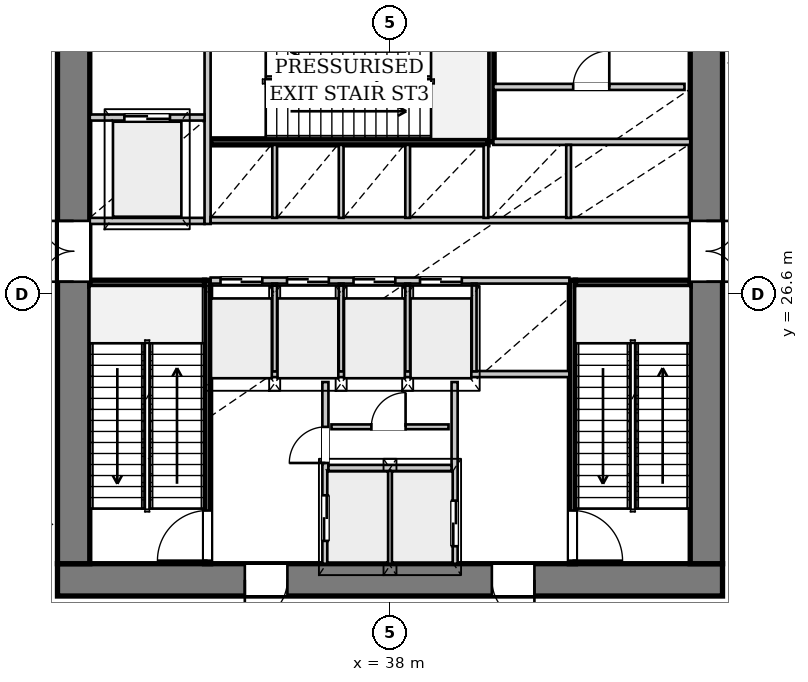
"""IFC4 building model, lengths in metres.
Left out: names, types, materials, properties, quantities, classifications, styles, units other than length and angle.
Written with IfcOpenShell. Run it as: python <this file> out.ifc"""

import sys

from ifc_helpers import new_model, si_unit, direction, frame, frame_2d, origin, place, context, subcontext, project, spatial, rectangle, extrude, source, transform, mapped, element, fill, save


model = new_model("IFC4")
c1 = context("Model", 3, precision=1e-05, world=origin(), true_north=direction((0.0, 1.0)))
c2 = subcontext(c1, "Body", "Model", "MODEL_VIEW")
j1 = project(units=[si_unit("LENGTHUNIT", "METRE"), si_unit("PLANEANGLEUNIT", "RADIAN")], contexts=[c1])
p1 = place(None, origin())
s1 = spatial("IfcSite", under=j1, at=p1, CompositionType="ELEMENT")
p2 = place(p1, origin())
s2 = spatial("IfcBuilding", under=s1, at=p2, CompositionType="ELEMENT")
p3 = place(p2, frame((0.0, 0.0, 10.2)))
s3 = spatial("IfcBuildingStorey", under=s2, at=p3, CompositionType="ELEMENT", Elevation=10.2)
p4 = place(p3, frame((46.75, 19.075, 0.0), z_axis=(0.0, 0.0, 1.0), x_axis=(-1.0, 0.0, 0.0)))
e1 = element("IfcWall", 1, at=p4, inside=s3, PredefinedType="SHEAR", context=c2, shape_type="SweptSolid", body=[
    extrude(rectangle(XDim=17.5, YDim=0.85, at=frame_2d((8.75, 0.0))), origin(), (0.0, 0.0, 1.0), 5.08),
])
p5 = place(p4, frame((4.95, 0.0, 0.0)))
e2 = element("IfcOpeningElement", 2, at=p5, cuts=e1, PredefinedType="OPENING", context=c2, shape_type="SweptSolid", body=[
    extrude(rectangle(XDim=1.12, YDim=2.25, at=frame_2d((0.56, 1.125))), frame((0.0, 0.435, 0.0), z_axis=(0.0, -1.0, 0.0), x_axis=(1.0, 0.0, 0.0)), (0.0, 0.0, 1.0), 0.87),
])
p6 = place(p4, frame((11.45, 0.0, 0.0)))
e3 = element("IfcOpeningElement", 3, at=p6, cuts=e1, PredefinedType="OPENING", context=c2, shape_type="SweptSolid", body=[
    extrude(rectangle(XDim=1.12, YDim=2.25, at=frame_2d((0.56, 1.125))), frame((0.0, 0.435, 0.0), z_axis=(0.0, -1.0, 0.0), x_axis=(1.0, 0.0, 0.0)), (0.0, 0.0, 1.0), 0.87),
])
p7 = place(p3, frame((29.675, 19.5, 0.0), z_axis=(0.0, 0.0, 1.0), x_axis=(0.0, 1.0, 0.0)))
e4 = element("IfcWall", 4, at=p7, inside=s3, PredefinedType="SHEAR", context=c2, shape_type="SweptSolid", body=[
    extrude(rectangle(XDim=14.2, YDim=0.85, at=frame_2d((7.1, 0.0))), origin(), (0.0, 0.0, 1.0), 5.08),
])
p8 = place(p7, frame((7.42, 0.0, 0.0)))
e5 = element("IfcOpeningElement", 5, at=p8, cuts=e4, PredefinedType="OPENING", context=c2, shape_type="SweptSolid", body=[
    extrude(rectangle(XDim=1.6, YDim=2.2, at=frame_2d((0.8, 1.1))), frame((0.0, 0.435, 0.0), z_axis=(0.0, -1.0, 0.0), x_axis=(1.0, 0.0, 0.0)), (0.0, 0.0, 1.0), 0.87),
])
p9 = place(p3, frame((46.325, 33.7, 0.0), z_axis=(0.0, 0.0, 1.0), x_axis=(0.0, -1.0, 0.0)))
e6 = element("IfcWall", 6, at=p9, inside=s3, PredefinedType="SHEAR", context=c2, shape_type="SweptSolid", body=[
    extrude(rectangle(XDim=14.2, YDim=0.85, at=frame_2d((7.1, 0.0))), origin(), (0.0, 0.0, 1.0), 5.08),
])
p10 = place(p9, frame((5.18, 0.0, 0.0)))
e7 = element("IfcOpeningElement", 7, at=p10, cuts=e6, PredefinedType="OPENING", context=c2, shape_type="SweptSolid", body=[
    extrude(rectangle(XDim=1.6, YDim=2.2, at=frame_2d((0.8, 1.1))), frame((0.0, 0.435, 0.0), z_axis=(0.0, -1.0, 0.0), x_axis=(1.0, 0.0, 0.0)), (0.0, 0.0, 1.0), 0.87),
])
p11 = place(p3, frame((33.2, 19.5, 0.0), z_axis=(0.0, 0.0, 1.0), x_axis=(0.0, 1.0, 0.0)))
e8 = element("IfcWall", 8, at=p11, inside=s3, PredefinedType="PARTITIONING", context=c2, shape_type="SweptSolid", body=[
    extrude(rectangle(XDim=7.46, YDim=0.16, at=frame_2d((3.73, 0.0))), origin(), (0.0, 0.0, 1.0), 5.08),
])
p12 = place(p11, frame((0.08, 0.0, 0.0)))
e9 = element("IfcOpeningElement", 9, at=p12, cuts=e8, PredefinedType="OPENING", context=c2, shape_type="SweptSolid", body=[
    extrude(rectangle(XDim=1.32, YDim=2.2, at=frame_2d((0.66, 1.1))), frame((0.0, 0.09, 0.0), z_axis=(0.0, -1.0, 0.0), x_axis=(1.0, 0.0, 0.0)), (0.0, 0.0, 1.0), 0.18),
])
p13 = place(p3, frame((30.1, 26.88, 0.0), z_axis=(0.0, 0.0, 1.0), x_axis=(1.0, 0.0, 0.0)))
e10 = element("IfcWall", 10, at=p13, inside=s3, PredefinedType="PARTITIONING", context=c2, shape_type="SweptSolid", body=[
    extrude(rectangle(XDim=3.02, YDim=0.16, at=frame_2d((1.51, 0.0))), origin(), (0.0, 0.0, 1.0), 5.08),
])
p14 = place(p3, frame((42.8, 26.96, 0.0), z_axis=(0.0, 0.0, 1.0), x_axis=(0.0, -1.0, 0.0)))
e11 = element("IfcWall", 11, at=p14, inside=s3, PredefinedType="PARTITIONING", context=c2, shape_type="SweptSolid", body=[
    extrude(rectangle(XDim=7.46, YDim=0.16, at=frame_2d((3.73, 0.0))), origin(), (0.0, 0.0, 1.0), 5.08),
])
p15 = place(p14, frame((6.06, 0.0, 0.0)))
e12 = element("IfcOpeningElement", 12, at=p15, cuts=e11, PredefinedType="OPENING", context=c2, shape_type="SweptSolid", body=[
    extrude(rectangle(XDim=1.32, YDim=2.2, at=frame_2d((0.66, 1.1))), frame((0.0, 0.09, 0.0), z_axis=(0.0, -1.0, 0.0), x_axis=(1.0, 0.0, 0.0)), (0.0, 0.0, 1.0), 0.18),
])
p16 = place(p3, frame((42.88, 26.88, 0.0), z_axis=(0.0, 0.0, 1.0), x_axis=(1.0, 0.0, 0.0)))
e13 = element("IfcWall", 13, at=p16, inside=s3, PredefinedType="PARTITIONING", context=c2, shape_type="SweptSolid", body=[
    extrude(rectangle(XDim=3.02, YDim=0.16, at=frame_2d((1.51, 0.0))), origin(), (0.0, 0.0, 1.0), 5.08),
])
p17 = place(p3, frame((33.28, 30.6, 0.0), z_axis=(0.0, 0.0, 1.0), x_axis=(1.0, 0.0, 0.0)))
e14 = element("IfcWall", 14, at=p17, inside=s3, PredefinedType="PARTITIONING", context=c2, shape_type="SweptSolid", body=[
    extrude(rectangle(XDim=7.3, YDim=0.16, at=frame_2d((3.65, 0.0))), origin(), (0.0, 0.0, 1.0), 5.08),
])
p18 = place(p3, frame((40.66, 30.6, 0.0), z_axis=(0.0, 0.0, 1.0), x_axis=(0.0, 1.0, 0.0)))
e15 = element("IfcWall", 15, at=p18, inside=s3, PredefinedType="PARTITIONING", context=c2, shape_type="SweptSolid", body=[
    extrude(rectangle(XDim=3.1, YDim=0.16, at=frame_2d((1.55, 0.0))), origin(), (0.0, 0.0, 1.0), 5.08),
])
p19 = place(p3, frame((36.3, 19.5, 0.0), z_axis=(0.0, 0.0, 1.0), x_axis=(0.0, 1.0, 0.0)))
e16 = element("IfcWall", 16, at=p19, inside=s3, PredefinedType="PARTITIONING", context=c2, shape_type="SweptSolid", body=[
    extrude(rectangle(XDim=4.78, YDim=0.16, at=frame_2d((2.39, 0.0))), origin(), (0.0, 0.0, 1.0), 5.08),
])
p20 = place(p19, frame((0.6, 0.0, 0.0)))
e17 = element("IfcOpeningElement", 17, at=p20, cuts=e16, PredefinedType="OPENING", context=c2, shape_type="SweptSolid", body=[
    extrude(rectangle(XDim=1.2, YDim=2.2, at=frame_2d((0.6, 1.1))), frame((0.0, 0.09, 0.0), z_axis=(0.0, -1.0, 0.0), x_axis=(1.0, 0.0, 0.0)), (0.0, 0.0, 1.0), 0.18),
])
p21 = place(p19, frame((2.65, 0.0, 0.0)))
e18 = element("IfcOpeningElement", 18, at=p21, cuts=e16, PredefinedType="OPENING", context=c2, shape_type="SweptSolid", body=[
    extrude(rectangle(XDim=0.95, YDim=2.1, at=frame_2d((0.475, 1.05))), frame((0.0, 0.09, 0.0), z_axis=(0.0, -1.0, 0.0), x_axis=(1.0, 0.0, 0.0)), (0.0, 0.0, 1.0), 0.18),
])
p22 = place(p3, frame((39.7, 24.28, 0.0), z_axis=(0.0, 0.0, 1.0), x_axis=(0.0, -1.0, 0.0)))
e19 = element("IfcWall", 19, at=p22, inside=s3, PredefinedType="PARTITIONING", context=c2, shape_type="SweptSolid", body=[
    extrude(rectangle(XDim=4.78, YDim=0.16, at=frame_2d((2.39, 0.0))), origin(), (0.0, 0.0, 1.0), 5.08),
])
p23 = place(p22, frame((3.12, 0.0, 0.0)))
e20 = element("IfcOpeningElement", 20, at=p23, cuts=e19, PredefinedType="OPENING", context=c2, shape_type="SweptSolid", body=[
    extrude(rectangle(XDim=1.2, YDim=2.2, at=frame_2d((0.6, 1.1))), frame((0.0, 0.09, 0.0), z_axis=(0.0, -1.0, 0.0), x_axis=(1.0, 0.0, 0.0)), (0.0, 0.0, 1.0), 0.18),
])
p24 = place(p3, frame((38.0, 19.5, 0.0), z_axis=(0.0, 0.0, 1.0), x_axis=(0.0, 1.0, 0.0)))
e21 = element("IfcWall", 21, at=p24, inside=s3, PredefinedType="PARTITIONING", context=c2, shape_type="SweptSolid", body=[
    extrude(rectangle(XDim=2.46, YDim=0.125, at=frame_2d((1.23, 0.0))), origin(), (0.0, 0.0, 1.0), 5.08),
])
p25 = place(p3, frame((36.38, 22.02, 0.0), z_axis=(0.0, 0.0, 1.0), x_axis=(1.0, 0.0, 0.0)))
e22 = element("IfcWall", 22, at=p25, inside=s3, PredefinedType="PARTITIONING", context=c2, shape_type="SweptSolid", body=[
    extrude(rectangle(XDim=3.24, YDim=0.16, at=frame_2d((1.62, 0.0))), origin(), (0.0, 0.0, 1.0), 5.08),
])
p26 = place(p3, frame((33.28, 24.49, 0.0), z_axis=(0.0, 0.0, 1.0), x_axis=(1.0, 0.0, 0.0)))
e23 = element("IfcWall", 23, at=p26, inside=s3, PredefinedType="PARTITIONING", context=c2, shape_type="SweptSolid", body=[
    extrude(rectangle(XDim=9.44, YDim=0.16, at=frame_2d((4.72, 0.0))), origin(), (0.0, 0.0, 1.0), 5.08),
])
p27 = place(p3, frame((36.46, 23.102, 0.0), z_axis=(0.0, 0.0, 1.0), x_axis=(1.0, 0.0, 0.0)))
e24 = element("IfcWall", 24, at=p27, inside=s3, PredefinedType="PARTITIONING", context=c2, shape_type="SweptSolid", body=[
    extrude(rectangle(XDim=3.08, YDim=0.125, at=frame_2d((1.54, 0.0))), origin(), (0.0, 0.0, 1.0), 5.08),
])
p28 = place(p27, frame((1.05, 0.0, 0.0)))
e25 = element("IfcOpeningElement", 25, at=p28, cuts=e24, PredefinedType="OPENING", context=c2, shape_type="SweptSolid", body=[
    extrude(rectangle(XDim=0.9, YDim=2.1, at=frame_2d((0.45, 1.05))), frame((0.0, 0.073, 0.0), z_axis=(0.0, -1.0, 0.0), x_axis=(1.0, 0.0, 0.0)), (0.0, 0.0, 1.0), 0.145),
])
p29 = place(p3, frame((30.1, 28.52, 0.0), z_axis=(0.0, 0.0, 1.0), x_axis=(1.0, 0.0, 0.0)))
e26 = element("IfcWall", 26, at=p29, inside=s3, PredefinedType="PARTITIONING", context=c2, shape_type="SweptSolid", body=[
    extrude(rectangle(XDim=3.02, YDim=0.16, at=frame_2d((1.51, 0.0))), origin(), (0.0, 0.0, 1.0), 5.08),
])
p30 = place(p3, frame((33.2, 28.44, 0.0), z_axis=(0.0, 0.0, 1.0), x_axis=(0.0, 1.0, 0.0)))
e27 = element("IfcWall", 27, at=p30, inside=s3, PredefinedType="PARTITIONING", context=c2, shape_type="SweptSolid", body=[
    extrude(rectangle(XDim=5.26, YDim=0.16, at=frame_2d((2.63, 0.0))), origin(), (0.0, 0.0, 1.0), 5.08),
])
p31 = place(p3, frame((30.1, 31.24, 0.0), z_axis=(0.0, 0.0, 1.0), x_axis=(1.0, 0.0, 0.0)))
e28 = element("IfcWall", 28, at=p31, inside=s3, PredefinedType="PARTITIONING", context=c2, shape_type="SweptSolid", body=[
    extrude(rectangle(XDim=3.02, YDim=0.16, at=frame_2d((1.51, 0.0))), origin(), (0.0, 0.0, 1.0), 5.08),
])
p32 = place(p31, frame((0.91, 0.0, 0.0)))
e29 = element("IfcOpeningElement", 29, at=p32, cuts=e28, PredefinedType="OPENING", context=c2, shape_type="SweptSolid", body=[
    extrude(rectangle(XDim=1.2, YDim=2.2, at=frame_2d((0.6, 1.1))), frame((0.0, 0.09, 0.0), z_axis=(0.0, -1.0, 0.0), x_axis=(1.0, 0.0, 0.0)), (0.0, 0.0, 1.0), 0.18),
])
p33 = place(p3, frame((33.28, 26.95, 0.0), z_axis=(0.0, 0.0, 1.0), x_axis=(1.0, 0.0, 0.0)))
e30 = element("IfcWall", 30, at=p33, inside=s3, PredefinedType="PARTITIONING", context=c2, shape_type="SweptSolid", body=[
    extrude(rectangle(XDim=9.44, YDim=0.16, at=frame_2d((4.72, 0.0))), origin(), (0.0, 0.0, 1.0), 5.08),
])
p34 = place(p33, frame((0.26, 0.0, 0.0)))
e31 = element("IfcOpeningElement", 31, at=p34, cuts=e30, PredefinedType="OPENING", context=c2, shape_type="SweptSolid", body=[
    extrude(rectangle(XDim=1.1, YDim=2.2, at=frame_2d((0.55, 1.1))), frame((0.0, 0.09, 0.0), z_axis=(0.0, -1.0, 0.0), x_axis=(1.0, 0.0, 0.0)), (0.0, 0.0, 1.0), 0.18),
])
p35 = place(p33, frame((2.01, 0.0, 0.0)))
e32 = element("IfcOpeningElement", 32, at=p35, cuts=e30, PredefinedType="OPENING", context=c2, shape_type="SweptSolid", body=[
    extrude(rectangle(XDim=1.1, YDim=2.2, at=frame_2d((0.55, 1.1))), frame((0.0, 0.09, 0.0), z_axis=(0.0, -1.0, 0.0), x_axis=(1.0, 0.0, 0.0)), (0.0, 0.0, 1.0), 0.18),
])
p36 = place(p33, frame((3.76, 0.0, 0.0)))
e33 = element("IfcOpeningElement", 33, at=p36, cuts=e30, PredefinedType="OPENING", context=c2, shape_type="SweptSolid", body=[
    extrude(rectangle(XDim=1.1, YDim=2.2, at=frame_2d((0.55, 1.1))), frame((0.0, 0.09, 0.0), z_axis=(0.0, -1.0, 0.0), x_axis=(1.0, 0.0, 0.0)), (0.0, 0.0, 1.0), 0.18),
])
p37 = place(p33, frame((5.51, 0.0, 0.0)))
e34 = element("IfcOpeningElement", 34, at=p37, cuts=e30, PredefinedType="OPENING", context=c2, shape_type="SweptSolid", body=[
    extrude(rectangle(XDim=1.1, YDim=2.2, at=frame_2d((0.55, 1.1))), frame((0.0, 0.09, 0.0), z_axis=(0.0, -1.0, 0.0), x_axis=(1.0, 0.0, 0.0)), (0.0, 0.0, 1.0), 0.18),
])
for number, where, z_axis, x_axis in (
    (35, (34.965, 24.56, 0.0), (0.0, 0.0, 1.0), (0.0, 1.0, 0.0)),
    (36, (36.715, 24.56, 0.0), (0.0, 0.0, 1.0), (0.0, 1.0, 0.0)),
    (37, (38.465, 24.56, 0.0), (0.0, 0.0, 1.0), (0.0, 1.0, 0.0)),
    (38, (40.215, 24.56, 0.0), (0.0, 0.0, 1.0), (0.0, 1.0, 0.0)),
):
    element("IfcWall", number, at=place(p3, frame(where, z_axis=z_axis, x_axis=x_axis)), inside=s3, PredefinedType="PARTITIONING", context=c2, shape_type="SweptSolid", body=[
        extrude(rectangle(XDim=2.31, YDim=0.125, at=frame_2d((1.155, 0.0))), origin(), (0.0, 0.0, 1.0), 5.08),
    ])
p38 = place(p3, frame((33.28, 28.54, 0.0), z_axis=(0.0, 0.0, 1.0), x_axis=(1.0, 0.0, 0.0)))
e39 = element("IfcWall", 39, at=p38, inside=s3, PredefinedType="PARTITIONING", context=c2, shape_type="SweptSolid", body=[
    extrude(rectangle(XDim=12.62, YDim=0.16, at=frame_2d((6.31, 0.0))), origin(), (0.0, 0.0, 1.0), 5.08),
])
p39 = place(p3, frame((40.72, 30.6, 0.0), z_axis=(0.0, 0.0, 1.0), x_axis=(1.0, 0.0, 0.0)))
e40 = element("IfcWall", 40, at=p39, inside=s3, PredefinedType="PARTITIONING", context=c2, shape_type="SweptSolid", body=[
    extrude(rectangle(XDim=5.18, YDim=0.16, at=frame_2d((2.59, 0.0))), origin(), (0.0, 0.0, 1.0), 5.08),
])
for number, where, z_axis, x_axis in (
    (41, (34.965, 28.6, 0.0), (0.0, 0.0, 1.0), (0.0, 1.0, 0.0)),
    (42, (36.715, 28.6, 0.0), (0.0, 0.0, 1.0), (0.0, 1.0, 0.0)),
    (43, (38.465, 28.6, 0.0), (0.0, 0.0, 1.0), (0.0, 1.0, 0.0)),
    (44, (40.525, 28.6, 0.0), (0.0, 0.0, 1.0), (0.0, 1.0, 0.0)),
    (45, (42.7, 28.6, 0.0), (0.0, 0.0, 1.0), (0.0, 1.0, 0.0)),
):
    element("IfcWall", number, at=place(p3, frame(where, z_axis=z_axis, x_axis=x_axis)), inside=s3, PredefinedType="PARTITIONING", context=c2, shape_type="SweptSolid", body=[
        extrude(rectangle(XDim=1.92, YDim=0.125, at=frame_2d((0.96, 0.0))), origin(), (0.0, 0.0, 1.0), 5.08),
    ])
p40 = place(p3, frame((40.72, 32.046, 0.0), z_axis=(0.0, 0.0, 1.0), x_axis=(1.0, 0.0, 0.0)))
e46 = element("IfcWall", 46, at=p40, inside=s3, PredefinedType="PARTITIONING", context=c2, shape_type="SweptSolid", body=[
    extrude(rectangle(XDim=5.03, YDim=0.16, at=frame_2d((2.515, 0.0))), origin(), (0.0, 0.0, 1.0), 5.08),
])
p41 = place(p40, frame((2.1, 0.0, 0.0)))
e47 = element("IfcOpeningElement", 47, at=p41, cuts=e46, PredefinedType="OPENING", context=c2, shape_type="SweptSolid", body=[
    extrude(rectangle(XDim=0.95, YDim=2.1, at=frame_2d((0.475, 1.05))), frame((0.0, 0.09, 0.0), z_axis=(0.0, -1.0, 0.0), x_axis=(1.0, 0.0, 0.0)), (0.0, 0.0, 1.0), 0.18),
])
m1 = source(origin(), c2, "Body", "SweptSolid", [
    extrude(rectangle(XDim=1.12, YDim=2.25, at=frame_2d((0.56, 1.125))), frame((0.0, 0.025, 0.0), z_axis=(0.0, -1.0, 0.0), x_axis=(1.0, 0.0, 0.0)), (0.0, 0.0, 1.0), 0.05),
])
p42 = place(p5, origin())
e48 = element("IfcDoor", 48, at=p42, inside=s3, OperationType="SINGLE_SWING_LEFT", PredefinedType="DOOR", context=c2, shape_type="MappedRepresentation", body=[
    mapped(m1, transform((0.0, 0.0, 0.0), x_axis=(1.0, 0.0, 0.0), y_axis=(0.0, 1.0, 0.0), z_axis=(0.0, 0.0, 1.0), scale=1.0)),
])
fill(e2, e48)
p43 = place(p6, origin())
e49 = element("IfcDoor", 49, at=p43, inside=s3, OperationType="SINGLE_SWING_RIGHT", PredefinedType="DOOR", context=c2, shape_type="MappedRepresentation", body=[
    mapped(m1, transform((0.0, 0.0, 0.0), x_axis=(1.0, 0.0, 0.0), y_axis=(0.0, 1.0, 0.0), z_axis=(0.0, 0.0, 1.0), scale=1.0)),
])
fill(e3, e49)
m2 = source(origin(), c2, "Body", "SweptSolid", [
    extrude(rectangle(XDim=1.6, YDim=2.2, at=frame_2d((0.8, 1.1))), frame((0.0, 0.025, 0.0), z_axis=(0.0, -1.0, 0.0), x_axis=(1.0, 0.0, 0.0)), (0.0, 0.0, 1.0), 0.05),
])
p44 = place(p8, origin())
e50 = element("IfcDoor", 50, at=p44, inside=s3, OperationType="DOUBLE_DOOR_SINGLE_SWING", PredefinedType="DOOR", context=c2, shape_type="MappedRepresentation", body=[
    mapped(m2, transform((0.0, 0.0, 0.0), x_axis=(1.0, 0.0, 0.0), y_axis=(0.0, 1.0, 0.0), z_axis=(0.0, 0.0, 1.0), scale=1.0)),
])
fill(e5, e50)
p45 = place(p10, origin())
e51 = element("IfcDoor", 51, at=p45, inside=s3, OperationType="DOUBLE_DOOR_SINGLE_SWING", PredefinedType="DOOR", context=c2, shape_type="MappedRepresentation", body=[
    mapped(m2, transform((0.0, 0.0, 0.0), x_axis=(1.0, 0.0, 0.0), y_axis=(0.0, 1.0, 0.0), z_axis=(0.0, 0.0, 1.0), scale=1.0)),
])
fill(e7, e51)
m3 = source(origin(), c2, "Body", "SweptSolid", [
    extrude(rectangle(XDim=1.32, YDim=2.2, at=frame_2d((0.66, 1.1))), frame((0.0, 0.025, 0.0), z_axis=(0.0, -1.0, 0.0), x_axis=(1.0, 0.0, 0.0)), (0.0, 0.0, 1.0), 0.05),
])
p46 = place(p12, origin())
e52 = element("IfcDoor", 52, at=p46, inside=s3, OperationType="SINGLE_SWING_LEFT", PredefinedType="DOOR", context=c2, shape_type="MappedRepresentation", body=[
    mapped(m3, transform((0.0, 0.0, 0.0), x_axis=(1.0, 0.0, 0.0), y_axis=(0.0, 1.0, 0.0), z_axis=(0.0, 0.0, 1.0), scale=1.0)),
])
fill(e9, e52)
p47 = place(p15, origin())
e53 = element("IfcDoor", 53, at=p47, inside=s3, OperationType="SINGLE_SWING_RIGHT", PredefinedType="DOOR", context=c2, shape_type="MappedRepresentation", body=[
    mapped(m3, transform((0.0, 0.0, 0.0), x_axis=(1.0, 0.0, 0.0), y_axis=(0.0, 1.0, 0.0), z_axis=(0.0, 0.0, 1.0), scale=1.0)),
])
fill(e12, e53)
m4 = source(origin(), c2, "Body", "SweptSolid", [
    extrude(rectangle(XDim=1.2, YDim=2.2, at=frame_2d((0.6, 1.1))), frame((0.0, 0.025, 0.0), z_axis=(0.0, -1.0, 0.0), x_axis=(1.0, 0.0, 0.0)), (0.0, 0.0, 1.0), 0.05),
])
p48 = place(p20, origin())
e54 = element("IfcDoor", 54, at=p48, inside=s3, OperationType="DOUBLE_DOOR_SLIDING", PredefinedType="DOOR", context=c2, shape_type="MappedRepresentation", body=[
    mapped(m4, transform((0.0, 0.0, 0.0), x_axis=(1.0, 0.0, 0.0), y_axis=(0.0, 1.0, 0.0), z_axis=(0.0, 0.0, 1.0), scale=1.0)),
])
fill(e17, e54)
m5 = source(origin(), c2, "Body", "SweptSolid", [
    extrude(rectangle(XDim=0.95, YDim=2.1, at=frame_2d((0.475, 1.05))), frame((0.0, 0.025, 0.0), z_axis=(0.0, -1.0, 0.0), x_axis=(1.0, 0.0, 0.0)), (0.0, 0.0, 1.0), 0.05),
])
p49 = place(p21, origin())
e55 = element("IfcDoor", 55, at=p49, inside=s3, OperationType="SINGLE_SWING_LEFT", PredefinedType="DOOR", context=c2, shape_type="MappedRepresentation", body=[
    mapped(m5, transform((0.0, 0.0, 0.0), x_axis=(1.0, 0.0, 0.0), y_axis=(0.0, 1.0, 0.0), z_axis=(0.0, 0.0, 1.0), scale=1.0)),
])
fill(e18, e55)
m6 = source(origin(), c2, "Body", "SweptSolid", [
    extrude(rectangle(XDim=0.9, YDim=2.1, at=frame_2d((0.45, 1.05))), frame((0.0, 0.025, 0.0), z_axis=(0.0, -1.0, 0.0), x_axis=(1.0, 0.0, 0.0)), (0.0, 0.0, 1.0), 0.05),
])
p50 = place(p28, origin())
e56 = element("IfcDoor", 56, at=p50, inside=s3, OperationType="SINGLE_SWING_RIGHT", PredefinedType="DOOR", context=c2, shape_type="MappedRepresentation", body=[
    mapped(m6, transform((0.0, 0.0, 0.0), x_axis=(1.0, 0.0, 0.0), y_axis=(0.0, 1.0, 0.0), z_axis=(0.0, 0.0, 1.0), scale=1.0)),
])
fill(e25, e56)
p51 = place(p23, origin())
e57 = element("IfcDoor", 57, at=p51, inside=s3, OperationType="DOUBLE_DOOR_SLIDING", PredefinedType="DOOR", context=c2, shape_type="MappedRepresentation", body=[
    mapped(m4, transform((0.0, 0.0, 0.0), x_axis=(1.0, 0.0, 0.0), y_axis=(0.0, 1.0, 0.0), z_axis=(0.0, 0.0, 1.0), scale=1.0)),
])
fill(e20, e57)
p52 = place(p32, origin())
e58 = element("IfcDoor", 58, at=p52, inside=s3, OperationType="DOUBLE_DOOR_SLIDING", PredefinedType="DOOR", context=c2, shape_type="MappedRepresentation", body=[
    mapped(m4, transform((0.0, 0.0, 0.0), x_axis=(1.0, 0.0, 0.0), y_axis=(0.0, 1.0, 0.0), z_axis=(0.0, 0.0, 1.0), scale=1.0)),
])
fill(e29, e58)
m7 = source(origin(), c2, "Body", "SweptSolid", [
    extrude(rectangle(XDim=1.1, YDim=2.2, at=frame_2d((0.55, 1.1))), frame((0.0, 0.025, 0.0), z_axis=(0.0, -1.0, 0.0), x_axis=(1.0, 0.0, 0.0)), (0.0, 0.0, 1.0), 0.05),
])
p53 = place(p34, origin())
e59 = element("IfcDoor", 59, at=p53, inside=s3, OperationType="DOUBLE_DOOR_SLIDING", PredefinedType="DOOR", context=c2, shape_type="MappedRepresentation", body=[
    mapped(m7, transform((0.0, 0.0, 0.0), x_axis=(1.0, 0.0, 0.0), y_axis=(0.0, 1.0, 0.0), z_axis=(0.0, 0.0, 1.0), scale=1.0)),
])
fill(e31, e59)
p54 = place(p35, origin())
e60 = element("IfcDoor", 60, at=p54, inside=s3, OperationType="DOUBLE_DOOR_SLIDING", PredefinedType="DOOR", context=c2, shape_type="MappedRepresentation", body=[
    mapped(m7, transform((0.0, 0.0, 0.0), x_axis=(1.0, 0.0, 0.0), y_axis=(0.0, 1.0, 0.0), z_axis=(0.0, 0.0, 1.0), scale=1.0)),
])
fill(e32, e60)
p55 = place(p36, origin())
e61 = element("IfcDoor", 61, at=p55, inside=s3, OperationType="DOUBLE_DOOR_SLIDING", PredefinedType="DOOR", context=c2, shape_type="MappedRepresentation", body=[
    mapped(m7, transform((0.0, 0.0, 0.0), x_axis=(1.0, 0.0, 0.0), y_axis=(0.0, 1.0, 0.0), z_axis=(0.0, 0.0, 1.0), scale=1.0)),
])
fill(e33, e61)
p56 = place(p37, origin())
e62 = element("IfcDoor", 62, at=p56, inside=s3, OperationType="DOUBLE_DOOR_SLIDING", PredefinedType="DOOR", context=c2, shape_type="MappedRepresentation", body=[
    mapped(m7, transform((0.0, 0.0, 0.0), x_axis=(1.0, 0.0, 0.0), y_axis=(0.0, 1.0, 0.0), z_axis=(0.0, 0.0, 1.0), scale=1.0)),
])
fill(e34, e62)
p57 = place(p41, origin())
e63 = element("IfcDoor", 63, at=p57, inside=s3, OperationType="SINGLE_SWING_RIGHT", PredefinedType="DOOR", context=c2, shape_type="MappedRepresentation", body=[
    mapped(m5, transform((0.0, 0.0, 0.0), x_axis=(1.0, 0.0, 0.0), y_axis=(0.0, 1.0, 0.0), z_axis=(0.0, 0.0, 1.0), scale=1.0)),
])
fill(e47, e63)
save(model, sys.argv[1])
